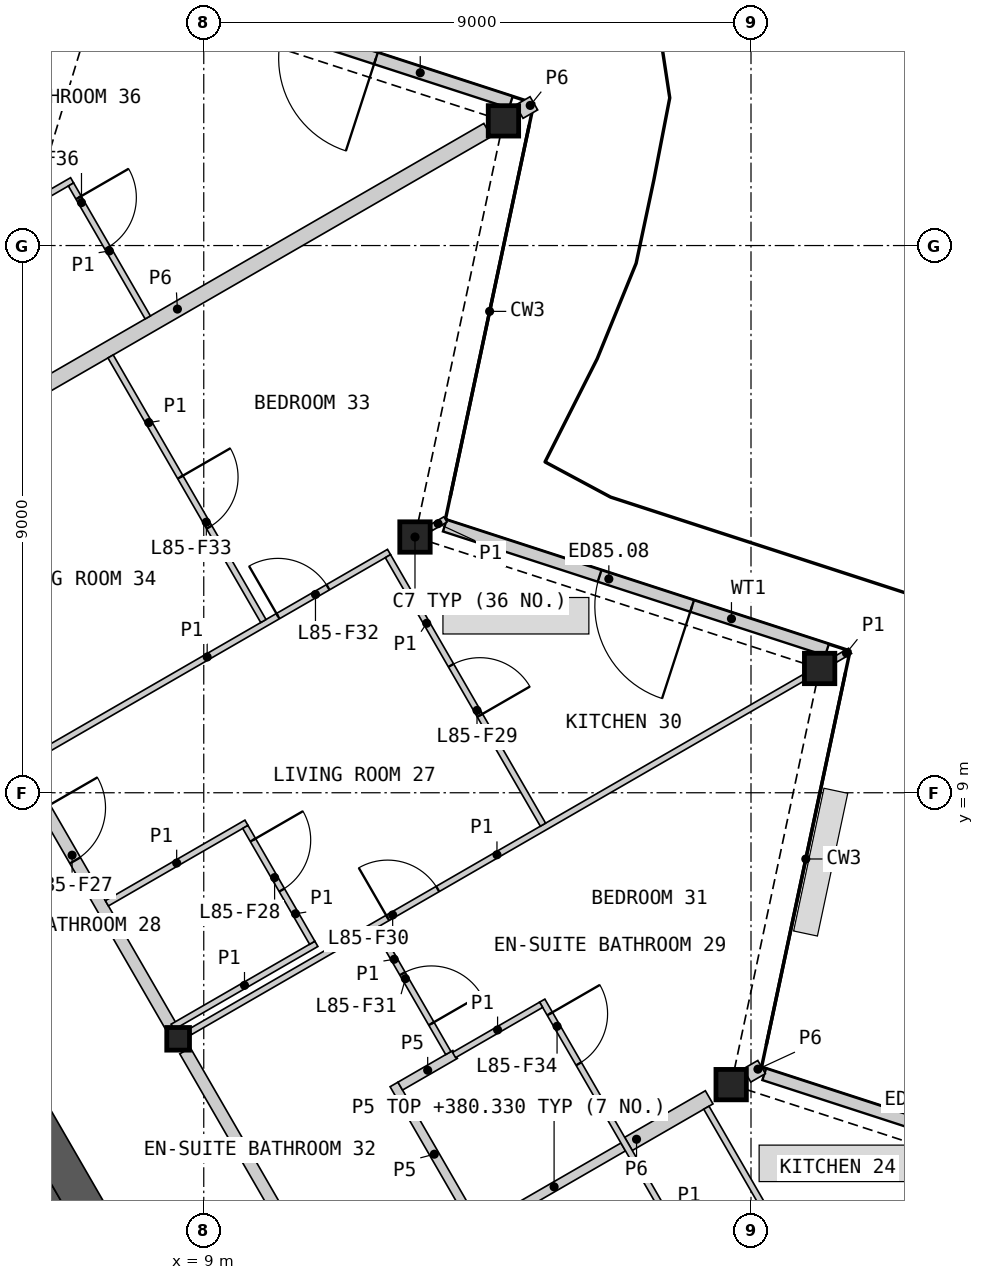
"""IFC4 building model, lengths in metres.
Left out: names, types, materials, properties, quantities, classifications, styles, units other than length and angle.
Written with IfcOpenShell. Run it as: python <this file> out.ifc"""

import sys

from ifc_helpers import new_model, si_unit, direction, frame, frame_2d, origin, origin_2d, place, context, subcontext, project, spatial, polyline, rectangle, hollow_rectangle, i_section, outline, extrude, element, fill, save


model = new_model("IFC4")
c1 = context("Model", 3, precision=1e-05, world=origin(), true_north=direction((0.0, 1.0)))
c2 = subcontext(c1, "Body", "Model", "MODEL_VIEW")
j1 = project(units=[si_unit("LENGTHUNIT", "METRE"), si_unit("PLANEANGLEUNIT", "RADIAN")], contexts=[c1])
p1 = place(None, origin())
s1 = spatial("IfcSite", under=j1, at=p1, CompositionType="ELEMENT")
p2 = place(p1, origin())
s2 = spatial("IfcBuilding", under=s1, at=p2, CompositionType="ELEMENT")
p3 = place(p2, frame((0.0, 0.0, 378.0)))
s3 = spatial("IfcBuildingStorey", under=s2, at=p3, CompositionType="ELEMENT", Elevation=378.0)
for number, where, z_axis, x_axis in (
    (1, (17.674, 4.199, 0.0), (0.0, 0.0, 1.0), (1.0, 0.0, 0.0)),
    (2, (19.129, 11.044, 0.0), (0.0, 0.0, 1.0), (1.0, 0.0, 0.0)),
    (3, (12.474, 13.206, 0.0), (0.0, 0.0, 1.0), (1.0, 0.0, 0.0)),
    (4, (13.929, 20.051, 0.0), (0.0, 0.0, 1.0), (1.0, 0.0, 0.0)),
):
    element("IfcColumn", number, at=place(p3, frame(where, z_axis=z_axis, x_axis=x_axis)), inside=s3, PredefinedType="COLUMN", context=c2, shape_type="SweptSolid", body=[
        extrude(hollow_rectangle(XDim=0.5, YDim=0.5, WallThickness=0.03, at=origin_2d()), origin(), (0.0, 0.0, 1.0), 3.4),
    ])
p4 = place(p3, frame((8.578, 4.953, 0.0), z_axis=(0.0, 0.0, 1.0), x_axis=(1.0, 0.0, 0.0)))
e5 = element("IfcColumn", 5, at=p4, inside=s3, PredefinedType="COLUMN", context=c2, shape_type="SweptSolid", body=[
    extrude(i_section(OverallWidth=0.374, OverallDepth=0.372, WebThickness=0.016, FlangeThickness=0.026, at=origin_2d()), origin(), (0.0, 0.0, 1.0), 3.4),
])
p5 = place(p3, frame((24.45, 2.344, 0.0), z_axis=(0.0, 0.0, 1.0), x_axis=(-0.951062538214, 0.308998460199, 0.0)))
e6 = element("IfcWall", 6, at=p5, inside=s3, PredefinedType="SOLIDWALL", context=c2, shape_type="SweptSolid", body=[
    extrude(rectangle(XDim=6.553, YDim=0.2, at=frame_2d((3.277, 0.0))), origin(), (0.0, 0.0, 1.0), 2.634),
])
p6 = place(p5, frame((2.333, 0.0, 0.0)))
e7 = element("IfcOpeningElement", 7, at=p6, cuts=e6, PredefinedType="OPENING", context=c2, shape_type="SweptSolid", body=[
    extrude(rectangle(XDim=1.6, YDim=2.25, at=frame_2d((0.8, 1.125))), frame((0.0, 0.11, 0.0), z_axis=(0.0, -1.0, 0.0), x_axis=(1.0, 0.0, 0.0)), (0.0, 0.0, 1.0), 0.22),
])
p7 = place(p3, frame((19.25, 11.351, 0.0), z_axis=(0.0, 0.0, 1.0), x_axis=(-0.951060668786, 0.309004214029, 0.0)))
e8 = element("IfcWall", 8, at=p7, inside=s3, PredefinedType="SOLIDWALL", context=c2, shape_type="SweptSolid", body=[
    extrude(rectangle(XDim=6.609, YDim=0.2, at=frame_2d((3.305, 0.0))), origin(), (0.0, 0.0, 1.0), 2.634),
])
p8 = place(p7, frame((2.333, 0.0, 0.0)))
e9 = element("IfcOpeningElement", 9, at=p8, cuts=e8, PredefinedType="OPENING", context=c2, shape_type="SweptSolid", body=[
    extrude(rectangle(XDim=1.6, YDim=2.25, at=frame_2d((0.8, 1.125))), frame((0.0, 0.11, 0.0), z_axis=(0.0, -1.0, 0.0), x_axis=(1.0, 0.0, 0.0)), (0.0, 0.0, 1.0), 0.22),
])
p9 = place(p3, frame((14.05, 20.357, 0.0), z_axis=(0.0, 0.0, 1.0), x_axis=(-0.951060123915, 0.309005891041, 0.0)))
e10 = element("IfcWall", 10, at=p9, inside=s3, PredefinedType="SOLIDWALL", context=c2, shape_type="SweptSolid", body=[
    extrude(rectangle(XDim=6.265, YDim=0.2, at=frame_2d((3.133, 0.0))), origin(), (0.0, 0.0, 1.0), 2.634),
])
p10 = place(p9, frame((2.333, 0.0, 0.0)))
e11 = element("IfcOpeningElement", 11, at=p10, cuts=e10, PredefinedType="OPENING", context=c2, shape_type="SweptSolid", body=[
    extrude(rectangle(XDim=1.6, YDim=2.25, at=frame_2d((0.8, 1.125))), frame((0.0, 0.11, 0.0), z_axis=(0.0, -1.0, 0.0), x_axis=(1.0, 0.0, 0.0)), (0.0, 0.0, 1.0), 0.22),
])
p11 = place(p3, origin())
e12 = element("IfcWall", 12, at=p11, inside=s3, PredefinedType="SHEAR", context=c2, shape_type="SweptSolid", body=[
    extrude(outline(polyline([(1.561, 6.097), (3.731, 7.35), (8.231, -0.444), (6.061, -1.697), (5.96, -1.524), (7.952, -0.374), (6.952, 1.358), (4.96, 0.208), (4.861, 0.381), (6.852, 1.531), (5.852, 3.263), (3.861, 2.113), (3.76, 2.287), (5.752, 3.437), (4.752, 5.169), (2.76, 4.019), (2.66, 4.192), (4.652, 5.342), (3.652, 7.074), (1.66, 5.924), (1.561, 6.097)])), origin(), (0.0, 0.0, 1.0), 3.1),
])
p12 = place(p3, frame((8.686, -0.634, 0.0), z_axis=(0.0, 0.0, 1.0), x_axis=(-0.500004601921, 0.866022746848, 0.0)))
e13 = element("IfcWall", 13, at=p12, inside=s3, PredefinedType="SHEAR", context=c2, shape_type="SweptSolid", body=[
    extrude(rectangle(XDim=16.853, YDim=0.6, at=frame_2d((8.426, 0.0))), origin(), (0.0, 0.0, 1.0), 3.1),
])
p13 = place(p3, frame((1.902, 16.302, 0.0), z_axis=(0.0, 0.0, 1.0), x_axis=(0.491233789602, 0.871027763021, 0.0)))
e14 = element("IfcWall", 14, at=p13, inside=s3, PredefinedType="PARTITIONING", context=c2, shape_type="SweptSolid", body=[
    extrude(rectangle(XDim=14.345, YDim=0.25, at=frame_2d((7.173, 0.0))), origin(), (0.0, 0.0, 1.0), 2.33),
])
p14 = place(p3, frame((3.465, 14.01, 0.0), z_axis=(0.0, 0.0, 1.0), x_axis=(0.866032376801, 0.499987922186, 0.0)))
e15 = element("IfcWall", 15, at=p14, inside=s3, PredefinedType="PARTITIONING", context=c2, shape_type="SweptSolid", body=[
    extrude(rectangle(XDim=11.782, YDim=0.25, at=frame_2d((5.891, 0.0))), origin(), (0.0, 0.0, 1.0), 2.33),
])
p15 = place(p3, frame((4.403, 12.185, 0.0), z_axis=(0.0, 0.0, 1.0), x_axis=(0.499992155518, -0.866029932751, 0.0)))
e16 = element("IfcWall", 16, at=p15, inside=s3, PredefinedType="PARTITIONING", context=c2, shape_type="SweptSolid", body=[
    extrude(rectangle(XDim=8.123, YDim=0.2, at=frame_2d((4.062, 0.0))), origin(), (0.0, 0.0, 1.0), 3.1),
])
p16 = place(p15, frame((3.963, 0.0, 0.0)))
e17 = element("IfcOpeningElement", 17, at=p16, cuts=e16, PredefinedType="OPENING", context=c2, shape_type="SweptSolid", body=[
    extrude(rectangle(XDim=1.0, YDim=2.1, at=frame_2d((0.5, 1.05))), frame((0.0, 0.11, 0.0), z_axis=(0.0, -1.0, 0.0), x_axis=(1.0, 0.0, 0.0)), (0.0, 0.0, 1.0), 0.22),
])
p17 = place(p3, frame((8.692, 4.756, 0.0), z_axis=(0.0, 0.0, 1.0), x_axis=(0.500001682468, -0.866024432409, 0.0)))
e18 = element("IfcWall", 18, at=p17, inside=s3, PredefinedType="PARTITIONING", context=c2, shape_type="SweptSolid", body=[
    extrude(rectangle(XDim=8.124, YDim=0.2, at=frame_2d((4.062, 0.0))), origin(), (0.0, 0.0, 1.0), 3.1),
])
p18 = place(p17, frame((5.97, 0.0, 0.0)))
e19 = element("IfcOpeningElement", 19, at=p18, cuts=e18, PredefinedType="OPENING", context=c2, shape_type="SweptSolid", body=[
    extrude(rectangle(XDim=1.0, YDim=2.1, at=frame_2d((0.5, 1.05))), frame((0.0, 0.11, 0.0), z_axis=(0.0, -1.0, 0.0), x_axis=(1.0, 0.0, 0.0)), (0.0, 0.0, 1.0), 0.22),
])
p19 = place(p3, frame((15.985, 3.224, 0.0), z_axis=(0.0, 0.0, 1.0), x_axis=(0.865989259495, 0.50006259852, 0.0)))
e20 = element("IfcWall", 20, at=p19, inside=s3, PredefinedType="PARTITIONING", context=c2, shape_type="SweptSolid", body=[
    extrude(rectangle(XDim=1.532, YDim=0.25, at=frame_2d((0.766, 0.0))), origin(), (0.0, 0.0, 1.0), 2.33),
])
for number, where, z_axis, x_axis in (
    (21, (14.189, 20.201, 0.0), (0.0, 0.0, 1.0), (0.866, 0.501, 0.0)),
    (22, (17.934, 4.35, 0.0), (0.0, 0.0, 1.0), (0.866, 0.5, 0.0)),
):
    element("IfcWall", number, at=place(p3, frame(where, z_axis=z_axis, x_axis=x_axis)), inside=s3, PredefinedType="PARTITIONING", context=c2, shape_type="SweptSolid", body=[
        extrude(rectangle(XDim=0.278, YDim=0.25, at=frame_2d((0.139, 0.0))), origin(), (0.0, 0.0, 1.0), 2.33),
    ])
p20 = place(p3, frame((13.625, 1.862, 0.0), z_axis=(0.0, 0.0, 1.0), x_axis=(0.866013657776, 0.500020344131, 0.0)))
e23 = element("IfcWall", 23, at=p20, inside=s3, PredefinedType="PLUMBINGWALL", context=c2, shape_type="SweptSolid", body=[
    extrude(rectangle(XDim=2.625, YDim=0.15, at=frame_2d((1.312, 0.0))), origin(), (0.0, 0.0, 1.0), 2.33),
])
p21 = place(p3, frame((12.129, 4.203, 0.0), z_axis=(0.0, 0.0, 1.0), x_axis=(0.499993606316, -0.866029095148, 0.0)))
e24 = element("IfcWall", 24, at=p21, inside=s3, PredefinedType="PLUMBINGWALL", context=c2, shape_type="SweptSolid", body=[
    extrude(rectangle(XDim=2.65, YDim=0.15, at=frame_2d((1.325, 0.0))), origin(), (0.0, 0.0, 1.0), 2.33),
])
p22 = place(p3, frame((12.232, 4.175, 0.0), z_axis=(0.0, 0.0, 1.0), x_axis=(0.866056787991, 0.499945637019, 0.0)))
e25 = element("IfcWall", 25, at=p22, inside=s3, PredefinedType="PLUMBINGWALL", context=c2, shape_type="SweptSolid", body=[
    extrude(rectangle(XDim=1.042, YDim=0.15, at=frame_2d((0.521, 0.0))), origin(), (0.0, 0.0, 1.0), 2.33),
])
p23 = place(p3, frame((8.775, 5.066, 0.0), z_axis=(0.0, 0.0, 1.0), x_axis=(0.866023724155, 0.500002909193, 0.0)))
e26 = element("IfcWall", 26, at=p23, inside=s3, PredefinedType="PARTITIONING", context=c2, shape_type="SweptSolid", body=[
    extrude(rectangle(XDim=11.655, YDim=0.1, at=frame_2d((5.827, 0.0))), origin(), (0.0, 0.0, 1.0), 2.33),
])
p24 = place(p23, frame((3.751, 0.0, 0.0)))
e27 = element("IfcOpeningElement", 27, at=p24, cuts=e26, PredefinedType="OPENING", context=c2, shape_type="SweptSolid", body=[
    extrude(rectangle(XDim=0.95, YDim=2.1, at=frame_2d((0.475, 1.05))), frame((0.0, 0.06, 0.0), z_axis=(0.0, -1.0, 0.0), x_axis=(1.0, 0.0, 0.0)), (0.0, 0.0, 1.0), 0.12),
])
p25 = place(p3, frame((6.065, 9.506, 0.0), z_axis=(0.0, 0.0, 1.0), x_axis=(0.866029020252, 0.499993736042, 0.0)))
e28 = element("IfcWall", 28, at=p25, inside=s3, PredefinedType="PARTITIONING", context=c2, shape_type="SweptSolid", body=[
    extrude(rectangle(XDim=6.907, YDim=0.1, at=frame_2d((3.454, 0.0))), origin(), (0.0, 0.0, 1.0), 2.33),
])
p26 = place(p25, frame((4.798, 0.0, 0.0)))
e29 = element("IfcOpeningElement", 29, at=p26, cuts=e28, PredefinedType="OPENING", context=c2, shape_type="SweptSolid", body=[
    extrude(rectangle(XDim=0.95, YDim=2.1, at=frame_2d((0.475, 1.05))), frame((0.0, 0.06, 0.0), z_axis=(0.0, -1.0, 0.0), x_axis=(1.0, 0.0, 0.0)), (0.0, 0.0, 1.0), 0.12),
])
p27 = place(p3, frame((14.567, 5.581, 0.0), z_axis=(0.0, 0.0, 1.0), x_axis=(0.499996545922, -0.866027397988, 0.0)))
e30 = element("IfcWall", 30, at=p27, inside=s3, PredefinedType="PARTITIONING", context=c2, shape_type="SweptSolid", body=[
    extrude(rectangle(XDim=5.5, YDim=0.1, at=frame_2d((2.75, 0.0))), origin(), (0.0, 0.0, 1.0), 2.33),
])
p28 = place(p27, frame((0.25, 0.0, 0.0)))
e31 = element("IfcOpeningElement", 31, at=p28, cuts=e30, PredefinedType="OPENING", context=c2, shape_type="SweptSolid", body=[
    extrude(rectangle(XDim=0.95, YDim=2.1, at=frame_2d((0.475, 1.05))), frame((0.0, 0.06, 0.0), z_axis=(0.0, -1.0, 0.0), x_axis=(1.0, 0.0, 0.0)), (0.0, 0.0, 1.0), 0.12),
])
p29 = place(p3, frame((7.468, 16.176, 0.0), z_axis=(0.0, 0.0, 1.0), x_axis=(0.499990214365, -0.86603105345, 0.0)))
e32 = element("IfcWall", 32, at=p29, inside=s3, PredefinedType="PARTITIONING", context=c2, shape_type="SweptSolid", body=[
    extrude(rectangle(XDim=5.025, YDim=0.1, at=frame_2d((2.512, 0.0))), origin(), (0.0, 0.0, 1.0), 2.33),
])
p30 = place(p29, frame((2.293, 0.0, 0.0)))
e33 = element("IfcOpeningElement", 33, at=p30, cuts=e32, PredefinedType="OPENING", context=c2, shape_type="SweptSolid", body=[
    extrude(rectangle(XDim=0.95, YDim=2.1, at=frame_2d((0.475, 1.05))), frame((0.0, 0.06, 0.0), z_axis=(0.0, -1.0, 0.0), x_axis=(1.0, 0.0, 0.0)), (0.0, 0.0, 1.0), 0.12),
])
p31 = place(p3, frame((12.029, 12.892, 0.0), z_axis=(0.0, 0.0, 1.0), x_axis=(0.500005610874, -0.86602216432, 0.0)))
e34 = element("IfcWall", 34, at=p31, inside=s3, PredefinedType="PARTITIONING", context=c2, shape_type="SweptSolid", body=[
    extrude(rectangle(XDim=5.1, YDim=0.1, at=frame_2d((2.55, 0.0))), origin(), (0.0, 0.0, 1.0), 2.33),
])
p32 = place(p31, frame((2.075, 0.0, 0.0)))
e35 = element("IfcOpeningElement", 35, at=p32, cuts=e34, PredefinedType="OPENING", context=c2, shape_type="SweptSolid", body=[
    extrude(rectangle(XDim=0.95, YDim=2.1, at=frame_2d((0.475, 1.05))), frame((0.0, 0.06, 0.0), z_axis=(0.0, -1.0, 0.0), x_axis=(1.0, 0.0, 0.0)), (0.0, 0.0, 1.0), 0.12),
])
p33 = place(p3, frame((17.266, 3.82, 0.0), z_axis=(0.0, 0.0, 1.0), x_axis=(0.499990214365, -0.86603105345, 0.0)))
e36 = element("IfcWall", 36, at=p33, inside=s3, PredefinedType="PARTITIONING", context=c2, shape_type="SweptSolid", body=[
    extrude(rectangle(XDim=5.025, YDim=0.1, at=frame_2d((2.512, 0.0))), origin(), (0.0, 0.0, 1.0), 2.33),
])
p34 = place(p33, frame((3.008, 0.0, 0.0)))
e37 = element("IfcOpeningElement", 37, at=p34, cuts=e36, PredefinedType="OPENING", context=c2, shape_type="SweptSolid", body=[
    extrude(rectangle(XDim=0.95, YDim=2.1, at=frame_2d((0.475, 1.05))), frame((0.0, 0.06, 0.0), z_axis=(0.0, -1.0, 0.0), x_axis=(1.0, 0.0, 0.0)), (0.0, 0.0, 1.0), 0.12),
])
p35 = place(p3, frame((4.323, 17.623, 0.0), z_axis=(0.0, 0.0, 1.0), x_axis=(0.866032775405, 0.499987231761, 0.0)))
e38 = element("IfcWall", 38, at=p35, inside=s3, PredefinedType="PARTITIONING", context=c2, shape_type="SweptSolid", body=[
    extrude(rectangle(XDim=2.9, YDim=0.1, at=frame_2d((1.45, 0.0))), origin(), (0.0, 0.0, 1.0), 2.33),
])
p36 = place(p3, frame((7.407, 7.182, 0.0), z_axis=(0.0, 0.0, 1.0), x_axis=(0.866052124492, 0.499953715521, 0.0)))
e39 = element("IfcWall", 39, at=p36, inside=s3, PredefinedType="PARTITIONING", context=c2, shape_type="SweptSolid", body=[
    extrude(rectangle(XDim=2.65, YDim=0.1, at=frame_2d((1.325, 0.0))), origin(), (0.0, 0.0, 1.0), 2.33),
])
p37 = place(p3, frame((6.817, 19.004, 0.0), z_axis=(0.0, 0.0, 1.0), x_axis=(0.499976333282, -0.866039067339, 0.0)))
e40 = element("IfcWall", 40, at=p37, inside=s3, PredefinedType="PARTITIONING", context=c2, shape_type="SweptSolid", body=[
    extrude(rectangle(XDim=2.525, YDim=0.1, at=frame_2d((1.262, 0.0))), origin(), (0.0, 0.0, 1.0), 2.33),
])
p38 = place(p37, frame((0.25, 0.0, 0.0)))
e41 = element("IfcOpeningElement", 41, at=p38, cuts=e40, PredefinedType="OPENING", context=c2, shape_type="SweptSolid", body=[
    extrude(rectangle(XDim=0.95, YDim=2.1, at=frame_2d((0.475, 1.05))), frame((0.0, 0.06, 0.0), z_axis=(0.0, -1.0, 0.0), x_axis=(1.0, 0.0, 0.0)), (0.0, 0.0, 1.0), 0.12),
])
p39 = place(p3, frame((8.488, 5.15, 0.0), z_axis=(0.0, 0.0, 1.0), x_axis=(0.866027727466, 0.499995975244, 0.0)))
e42 = element("IfcWall", 42, at=p39, inside=s3, PredefinedType="PARTITIONING", context=c2, shape_type="SweptSolid", body=[
    extrude(rectangle(XDim=2.73, YDim=0.1, at=frame_2d((1.365, 0.0))), origin(), (0.0, 0.0, 1.0), 2.33),
])
p40 = place(p3, frame((11.835, 6.775, 0.0), z_axis=(0.0, 0.0, 1.0), x_axis=(0.500030943131, -0.866007538022, 0.0)))
e43 = element("IfcWall", 43, at=p40, inside=s3, PredefinedType="PARTITIONING", context=c2, shape_type="SweptSolid", body=[
    extrude(rectangle(XDim=2.375, YDim=0.1, at=frame_2d((1.188, 0.0))), origin(), (0.0, 0.0, 1.0), 2.33),
])
p41 = place(p40, frame((0.867, 0.0, 0.0)))
e44 = element("IfcOpeningElement", 44, at=p41, cuts=e43, PredefinedType="OPENING", context=c2, shape_type="SweptSolid", body=[
    extrude(rectangle(XDim=0.95, YDim=2.1, at=frame_2d((0.475, 1.05))), frame((0.0, 0.06, 0.0), z_axis=(0.0, -1.0, 0.0), x_axis=(1.0, 0.0, 0.0)), (0.0, 0.0, 1.0), 0.12),
])
p42 = place(p3, frame((9.684, 8.438, 0.0), z_axis=(0.0, 0.0, 1.0), x_axis=(0.499994660107, -0.866028486751, 0.0)))
e45 = element("IfcWall", 45, at=p42, inside=s3, PredefinedType="PARTITIONING", context=c2, shape_type="SweptSolid", body=[
    extrude(rectangle(XDim=2.2, YDim=0.1, at=frame_2d((1.1, 0.0))), origin(), (0.0, 0.0, 1.0), 2.33),
])
p43 = place(p42, frame((0.25, 0.0, 0.0)))
e46 = element("IfcOpeningElement", 46, at=p43, cuts=e45, PredefinedType="OPENING", context=c2, shape_type="SweptSolid", body=[
    extrude(rectangle(XDim=0.95, YDim=2.1, at=frame_2d((0.475, 1.05))), frame((0.0, 0.06, 0.0), z_axis=(0.0, -1.0, 0.0), x_axis=(1.0, 0.0, 0.0)), (0.0, 0.0, 1.0), 0.12),
])
p44 = place(p3, frame((13.116, 4.686, 0.0), z_axis=(0.0, 0.0, 1.0), x_axis=(0.866072496716, 0.499918423778, 0.0)))
e47 = element("IfcWall", 47, at=p44, inside=s3, PredefinedType="PARTITIONING", context=c2, shape_type="SweptSolid", body=[
    extrude(rectangle(XDim=1.654, YDim=0.1, at=frame_2d((0.827, 0.0))), origin(), (0.0, 0.0, 1.0), 2.33),
])
p45 = place(p3, frame((12.734, 13.356, 0.0), z_axis=(0.0, 0.0, 1.0), x_axis=(0.865687176694, 0.50058536945, 0.0)))
e48 = element("IfcWall", 48, at=p45, inside=s3, PredefinedType="PARTITIONING", context=c2, shape_type="SweptSolid", body=[
    extrude(rectangle(XDim=0.278, YDim=0.1, at=frame_2d((0.139, 0.0))), origin(), (0.0, 0.0, 1.0), 2.33),
])
p46 = place(p3, frame((19.389, 11.194, 0.0), z_axis=(0.0, 0.0, 1.0), x_axis=(0.866068339032, 0.499925626596, 0.0)))
e49 = element("IfcWall", 49, at=p46, inside=s3, PredefinedType="PARTITIONING", context=c2, shape_type="SweptSolid", body=[
    extrude(rectangle(XDim=0.277, YDim=0.1, at=frame_2d((0.139, 0.0))), origin(), (0.0, 0.0, 1.0), 2.33),
])
p47 = place(p8, origin())
e50 = element("IfcDoor", 50, at=p47, inside=s3, OperationType="DOUBLE_DOOR_SINGLE_SWING", PredefinedType="DOOR", context=c2, shape_type="SweptSolid", body=[
    extrude(rectangle(XDim=1.6, YDim=2.25, at=frame_2d((0.8, 1.125))), frame((0.0, 0.025, 0.0), z_axis=(0.0, -1.0, 0.0), x_axis=(1.0, 0.0, 0.0)), (0.0, 0.0, 1.0), 0.05),
])
fill(e9, e50)
p48 = place(p10, origin())
e51 = element("IfcDoor", 51, at=p48, inside=s3, OperationType="DOUBLE_DOOR_SINGLE_SWING", PredefinedType="DOOR", context=c2, shape_type="SweptSolid", body=[
    extrude(rectangle(XDim=1.6, YDim=2.25, at=frame_2d((0.8, 1.125))), frame((0.0, 0.025, 0.0), z_axis=(0.0, -1.0, 0.0), x_axis=(1.0, 0.0, 0.0)), (0.0, 0.0, 1.0), 0.05),
])
fill(e11, e51)
p49 = place(p16, origin())
e52 = element("IfcDoor", 52, at=p49, inside=s3, OperationType="SINGLE_SWING_LEFT", PredefinedType="DOOR", context=c2, shape_type="SweptSolid", body=[
    extrude(rectangle(XDim=1.0, YDim=2.1, at=frame_2d((0.5, 1.05))), frame((0.0, 0.025, 0.0), z_axis=(0.0, -1.0, 0.0), x_axis=(1.0, 0.0, 0.0)), (0.0, 0.0, 1.0), 0.05),
])
fill(e17, e52)
p50 = place(p43, origin())
e53 = element("IfcDoor", 53, at=p50, inside=s3, OperationType="SINGLE_SWING_LEFT", PredefinedType="DOOR", context=c2, shape_type="SweptSolid", body=[
    extrude(rectangle(XDim=0.95, YDim=2.1, at=frame_2d((0.475, 1.05))), frame((0.0, 0.025, 0.0), z_axis=(0.0, -1.0, 0.0), x_axis=(1.0, 0.0, 0.0)), (0.0, 0.0, 1.0), 0.05),
])
fill(e46, e53)
p51 = place(p32, origin())
e54 = element("IfcDoor", 54, at=p51, inside=s3, OperationType="SINGLE_SWING_RIGHT", PredefinedType="DOOR", context=c2, shape_type="SweptSolid", body=[
    extrude(rectangle(XDim=0.95, YDim=2.1, at=frame_2d((0.475, 1.05))), frame((0.0, 0.025, 0.0), z_axis=(0.0, -1.0, 0.0), x_axis=(1.0, 0.0, 0.0)), (0.0, 0.0, 1.0), 0.05),
])
fill(e35, e54)
p52 = place(p24, origin())
e55 = element("IfcDoor", 55, at=p52, inside=s3, OperationType="SINGLE_SWING_LEFT", PredefinedType="DOOR", context=c2, shape_type="SweptSolid", body=[
    extrude(rectangle(XDim=0.95, YDim=2.1, at=frame_2d((0.475, 1.05))), frame((0.0, 0.025, 0.0), z_axis=(0.0, -1.0, 0.0), x_axis=(1.0, 0.0, 0.0)), (0.0, 0.0, 1.0), 0.05),
])
fill(e27, e55)
p53 = place(p41, origin())
e56 = element("IfcDoor", 56, at=p53, inside=s3, OperationType="SINGLE_SWING_RIGHT", PredefinedType="DOOR", context=c2, shape_type="SweptSolid", body=[
    extrude(rectangle(XDim=0.95, YDim=2.1, at=frame_2d((0.475, 1.05))), frame((0.0, 0.025, 0.0), z_axis=(0.0, -1.0, 0.0), x_axis=(1.0, 0.0, 0.0)), (0.0, 0.0, 1.0), 0.05),
])
fill(e44, e56)
p54 = place(p26, origin())
e57 = element("IfcDoor", 57, at=p54, inside=s3, OperationType="SINGLE_SWING_LEFT", PredefinedType="DOOR", context=c2, shape_type="SweptSolid", body=[
    extrude(rectangle(XDim=0.95, YDim=2.1, at=frame_2d((0.475, 1.05))), frame((0.0, 0.025, 0.0), z_axis=(0.0, -1.0, 0.0), x_axis=(1.0, 0.0, 0.0)), (0.0, 0.0, 1.0), 0.05),
])
fill(e29, e57)
p55 = place(p30, origin())
e58 = element("IfcDoor", 58, at=p55, inside=s3, OperationType="SINGLE_SWING_LEFT", PredefinedType="DOOR", context=c2, shape_type="SweptSolid", body=[
    extrude(rectangle(XDim=0.95, YDim=2.1, at=frame_2d((0.475, 1.05))), frame((0.0, 0.025, 0.0), z_axis=(0.0, -1.0, 0.0), x_axis=(1.0, 0.0, 0.0)), (0.0, 0.0, 1.0), 0.05),
])
fill(e33, e58)
p56 = place(p28, origin())
e59 = element("IfcDoor", 59, at=p56, inside=s3, OperationType="SINGLE_SWING_LEFT", PredefinedType="DOOR", context=c2, shape_type="SweptSolid", body=[
    extrude(rectangle(XDim=0.95, YDim=2.1, at=frame_2d((0.475, 1.05))), frame((0.0, 0.025, 0.0), z_axis=(0.0, -1.0, 0.0), x_axis=(1.0, 0.0, 0.0)), (0.0, 0.0, 1.0), 0.05),
])
fill(e31, e59)
p57 = place(p38, origin())
e60 = element("IfcDoor", 60, at=p57, inside=s3, OperationType="SINGLE_SWING_LEFT", PredefinedType="DOOR", context=c2, shape_type="SweptSolid", body=[
    extrude(rectangle(XDim=0.95, YDim=2.1, at=frame_2d((0.475, 1.05))), frame((0.0, 0.025, 0.0), z_axis=(0.0, -1.0, 0.0), x_axis=(1.0, 0.0, 0.0)), (0.0, 0.0, 1.0), 0.05),
])
fill(e41, e60)
save(model, sys.argv[1])
